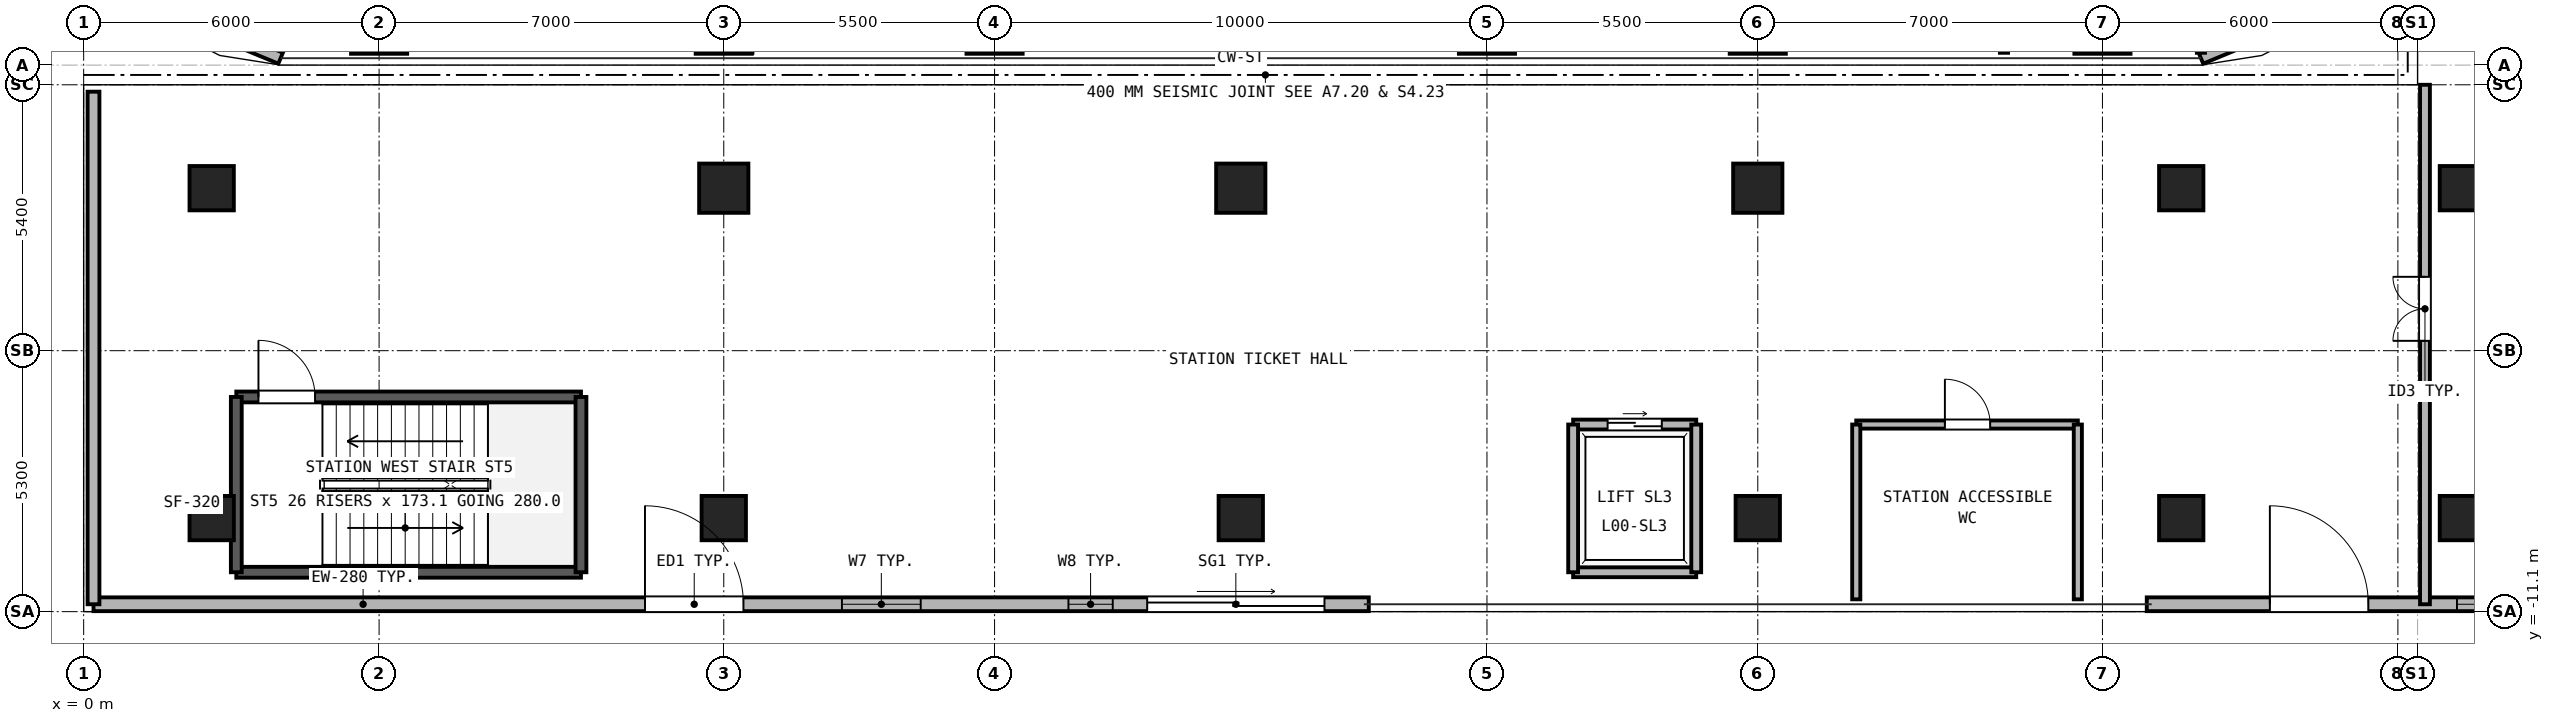
"""IFC4 building model, lengths in metres.
Left out: names, types, materials, properties, quantities, classifications, styles, units other than length and angle.
Written with IfcOpenShell. Run it as: python <this file> out.ifc"""

import sys

from ifc_helpers import new_model, si_unit, direction, frame, frame_2d, origin, origin_2d, place, context, subcontext, project, spatial, rectangle, hollow_rectangle, circle, extrude, source, transform, mapped, element, fill, save


model = new_model("IFC4")
c1 = context("Model", 3, precision=1e-05, world=origin(), true_north=direction((0.0, 1.0)))
c2 = subcontext(c1, "Body", "Model", "MODEL_VIEW")
j1 = project(units=[si_unit("LENGTHUNIT", "METRE"), si_unit("PLANEANGLEUNIT", "RADIAN")], contexts=[c1])
p1 = place(None, origin())
s1 = spatial("IfcSite", under=j1, at=p1, CompositionType="ELEMENT")
p2 = place(p1, origin())
s2 = spatial("IfcBuilding", under=s1, at=p2, CompositionType="ELEMENT")
p3 = place(p2, origin())
s3 = spatial("IfcBuildingStorey", under=s2, at=p3, CompositionType="ELEMENT", Elevation=0.0)
m1 = source(origin(), c2, "Body", "SweptSolid", [
    extrude(hollow_rectangle(XDim=1.14, YDim=1.14, WallThickness=0.07, at=origin_2d()), origin(), (0.0, 0.0, 1.0), 4.18),
])
for number, where, z_axis, x_axis in (
    (1, (6.0, 0.8, 0.0), (0.0, 0.0, 1.0), (1.0, 0.0, 0.0)),
    (2, (13.0, 0.8, 0.0), (0.0, 0.0, 1.0), (1.0, 0.0, 0.0)),
    (3, (18.5, 0.8, 0.0), (0.0, 0.0, 1.0), (1.0, 0.0, 0.0)),
    (4, (28.5, 0.8, 0.0), (0.0, 0.0, 1.0), (1.0, 0.0, 0.0)),
    (5, (34.0, 0.8, 0.0), (0.0, 0.0, 1.0), (1.0, 0.0, 0.0)),
    (6, (41.0, 0.8, 0.0), (0.0, 0.0, 1.0), (1.0, 0.0, 0.0)),
):
    element("IfcColumn", number, at=place(p3, frame(where, z_axis=z_axis, x_axis=x_axis)), inside=s3, PredefinedType="COLUMN", context=c2, shape_type="MappedRepresentation", body=[
        mapped(m1, transform((0.0, 0.0, 0.0), x_axis=(1.0, 0.0, 0.0), y_axis=(0.0, 1.0, 0.0), z_axis=(0.0, 0.0, 1.0), scale=1.0)),
    ])
m2 = source(origin(), c2, "Body", "SweptSolid", [
    extrude(hollow_rectangle(XDim=0.7, YDim=0.9, WallThickness=0.04, at=origin_2d()), origin(), (0.0, 0.0, 1.0), 4.18),
])
for number, where, z_axis, x_axis in (
    (7, (2.6, -9.2, 0.0), (0.0, 0.0, 1.0), (1.0, 0.0, 0.0)),
    (8, (2.6, -2.5, 0.0), (0.0, 0.0, 1.0), (1.0, 0.0, 0.0)),
    (9, (13.0, -9.2, 0.0), (0.0, 0.0, 1.0), (1.0, 0.0, 0.0)),
):
    element("IfcColumn", number, at=place(p3, frame(where, z_axis=z_axis, x_axis=x_axis)), inside=s3, PredefinedType="COLUMN", context=c2, shape_type="MappedRepresentation", body=[
        mapped(m2, transform((0.0, 0.0, 0.0), x_axis=(1.0, 0.0, 0.0), y_axis=(0.0, 1.0, 0.0), z_axis=(0.0, 0.0, 1.0), scale=1.0)),
    ])
m3 = source(origin(), c2, "Body", "SweptSolid", [
    extrude(circle(Radius=0.5, at=origin_2d()), origin(), (0.0, 0.0, 1.0), 4.18),
])
p4 = place(p3, frame((13.0, -2.5, 0.0), z_axis=(0.0, 0.0, 1.0), x_axis=(1.0, 0.0, 0.0)))
e10 = element("IfcColumn", 10, at=p4, inside=s3, PredefinedType="COLUMN", context=c2, shape_type="MappedRepresentation", body=[
    mapped(m3, transform((0.0, 0.0, 0.0), x_axis=(1.0, 0.0, 0.0), y_axis=(0.0, 1.0, 0.0), z_axis=(0.0, 0.0, 1.0), scale=1.0)),
])
p5 = place(p3, frame((23.5, -9.2, 0.0), z_axis=(0.0, 0.0, 1.0), x_axis=(1.0, 0.0, 0.0)))
e11 = element("IfcColumn", 11, at=p5, inside=s3, PredefinedType="COLUMN", context=c2, shape_type="MappedRepresentation", body=[
    mapped(m2, transform((0.0, 0.0, 0.0), x_axis=(1.0, 0.0, 0.0), y_axis=(0.0, 1.0, 0.0), z_axis=(0.0, 0.0, 1.0), scale=1.0)),
])
p6 = place(p3, frame((23.5, -2.5, 0.0), z_axis=(0.0, 0.0, 1.0), x_axis=(1.0, 0.0, 0.0)))
e12 = element("IfcColumn", 12, at=p6, inside=s3, PredefinedType="COLUMN", context=c2, shape_type="MappedRepresentation", body=[
    mapped(m3, transform((0.0, 0.0, 0.0), x_axis=(1.0, 0.0, 0.0), y_axis=(0.0, 1.0, 0.0), z_axis=(0.0, 0.0, 1.0), scale=1.0)),
])
p7 = place(p3, frame((34.0, -9.2, 0.0), z_axis=(0.0, 0.0, 1.0), x_axis=(1.0, 0.0, 0.0)))
e13 = element("IfcColumn", 13, at=p7, inside=s3, PredefinedType="COLUMN", context=c2, shape_type="MappedRepresentation", body=[
    mapped(m2, transform((0.0, 0.0, 0.0), x_axis=(1.0, 0.0, 0.0), y_axis=(0.0, 1.0, 0.0), z_axis=(0.0, 0.0, 1.0), scale=1.0)),
])
p8 = place(p3, frame((34.0, -2.5, 0.0), z_axis=(0.0, 0.0, 1.0), x_axis=(1.0, 0.0, 0.0)))
e14 = element("IfcColumn", 14, at=p8, inside=s3, PredefinedType="COLUMN", context=c2, shape_type="MappedRepresentation", body=[
    mapped(m3, transform((0.0, 0.0, 0.0), x_axis=(1.0, 0.0, 0.0), y_axis=(0.0, 1.0, 0.0), z_axis=(0.0, 0.0, 1.0), scale=1.0)),
])
for number, where, z_axis, x_axis in (
    (15, (42.6, -9.2, 0.0), (0.0, 0.0, 1.0), (1.0, 0.0, 0.0)),
    (16, (42.6, -2.5, 0.0), (0.0, 0.0, 1.0), (1.0, 0.0, 0.0)),
    (17, (48.3, -9.2, 0.0), (0.0, 0.0, 1.0), (1.0, 0.0, 0.0)),
    (18, (48.3, -2.5, 0.0), (0.0, 0.0, 1.0), (1.0, 0.0, 0.0)),
):
    element("IfcColumn", number, at=place(p3, frame(where, z_axis=z_axis, x_axis=x_axis)), inside=s3, PredefinedType="COLUMN", context=c2, shape_type="MappedRepresentation", body=[
        mapped(m2, transform((0.0, 0.0, 0.0), x_axis=(1.0, 0.0, 0.0), y_axis=(0.0, 1.0, 0.0), z_axis=(0.0, 0.0, 1.0), scale=1.0)),
    ])
for number, where, z_axis, x_axis in (
    (19, (43.0, 0.14, 0.0), (0.0, 0.0, 1.0), (0.924, 0.383, 0.0)),
    (20, (1.271, 1.271, 0.0), (0.0, 0.0, 1.0), (0.924, -0.383, 0.0)),
):
    element("IfcWall", number, at=place(p3, frame(where, z_axis=z_axis, x_axis=x_axis)), inside=s3, PredefinedType="SOLIDWALL", context=c2, shape_type="SweptSolid", body=[
        extrude(rectangle(XDim=2.954, YDim=0.24, at=frame_2d((1.477, 0.0))), origin(), (0.0, 0.0, 1.0), 4.18),
    ])
p9 = place(p3, frame((0.2, -10.95, 0.0), z_axis=(0.0, 0.0, 1.0), x_axis=(1.0, 0.0, 0.0)))
e21 = element("IfcWall", 21, at=p9, inside=s3, PredefinedType="SOLIDWALL", context=c2, shape_type="SweptSolid", body=[
    extrude(rectangle(XDim=25.9, YDim=0.28, at=frame_2d((12.95, 0.0))), origin(), (0.0, 0.0, 1.0), 4.18),
])
p10 = place(p9, frame((15.2, 0.0, 1.1)))
e22 = element("IfcOpeningElement", 22, at=p10, cuts=e21, PredefinedType="OPENING", context=c2, shape_type="SweptSolid", body=[
    extrude(rectangle(XDim=1.6, YDim=1.4, at=frame_2d((0.8, 0.7))), frame((0.0, 0.15, 0.0), z_axis=(0.0, -1.0, 0.0), x_axis=(1.0, 0.0, 0.0)), (0.0, 0.0, 1.0), 0.3),
])
p11 = place(p9, frame((19.8, 0.0, 1.1)))
e23 = element("IfcOpeningElement", 23, at=p11, cuts=e21, PredefinedType="OPENING", context=c2, shape_type="SweptSolid", body=[
    extrude(rectangle(XDim=0.9, YDim=1.5, at=frame_2d((0.45, 0.75))), frame((0.0, 0.15, 0.0), z_axis=(0.0, -1.0, 0.0), x_axis=(1.0, 0.0, 0.0)), (0.0, 0.0, 1.0), 0.3),
])
p12 = place(p9, frame((11.2, 0.0, 0.0)))
e24 = element("IfcOpeningElement", 24, at=p12, cuts=e21, PredefinedType="OPENING", context=c2, shape_type="SweptSolid", body=[
    extrude(rectangle(XDim=2.0, YDim=2.4, at=frame_2d((1.0, 1.2))), frame((0.0, 0.15, 0.0), z_axis=(0.0, -1.0, 0.0), x_axis=(1.0, 0.0, 0.0)), (0.0, 0.0, 1.0), 0.3),
])
p13 = place(p9, frame((21.4, 0.0, 0.0)))
e25 = element("IfcOpeningElement", 25, at=p13, cuts=e21, PredefinedType="OPENING", context=c2, shape_type="SweptSolid", body=[
    extrude(rectangle(XDim=3.6, YDim=3.2, at=frame_2d((1.8, 1.6))), frame((0.0, 0.15, 0.0), z_axis=(0.0, -1.0, 0.0), x_axis=(1.0, 0.0, 0.0)), (0.0, 0.0, 1.0), 0.3),
])
p14 = place(p3, frame((41.9, -10.95, 0.0), z_axis=(0.0, 0.0, 1.0), x_axis=(1.0, 0.0, 0.0)))
e26 = element("IfcWall", 26, at=p14, inside=s3, PredefinedType="SOLIDWALL", context=c2, shape_type="SweptSolid", body=[
    extrude(rectangle(XDim=29.55, YDim=0.28, at=frame_2d((14.775, 0.0))), origin(), (0.0, 0.0, 1.0), 4.18),
])
p15 = place(p14, frame((6.3, 0.0, 1.1)))
e27 = element("IfcOpeningElement", 27, at=p15, cuts=e26, PredefinedType="OPENING", context=c2, shape_type="SweptSolid", body=[
    extrude(rectangle(XDim=1.6, YDim=1.4, at=frame_2d((0.8, 0.7))), frame((0.0, 0.15, 0.0), z_axis=(0.0, -1.0, 0.0), x_axis=(1.0, 0.0, 0.0)), (0.0, 0.0, 1.0), 0.3),
])
p16 = place(p14, frame((2.5, 0.0, 0.0)))
e28 = element("IfcOpeningElement", 28, at=p16, cuts=e26, PredefinedType="OPENING", context=c2, shape_type="SweptSolid", body=[
    extrude(rectangle(XDim=2.0, YDim=2.4, at=frame_2d((1.0, 1.2))), frame((0.0, 0.15, 0.0), z_axis=(0.0, -1.0, 0.0), x_axis=(1.0, 0.0, 0.0)), (0.0, 0.0, 1.0), 0.3),
])
p17 = place(p14, frame((9.7, 0.0, 0.0)))
e29 = element("IfcOpeningElement", 29, at=p17, cuts=e26, PredefinedType="OPENING", context=c2, shape_type="SweptSolid", body=[
    extrude(rectangle(XDim=3.6, YDim=3.2, at=frame_2d((1.8, 1.6))), frame((0.0, 0.15, 0.0), z_axis=(0.0, -1.0, 0.0), x_axis=(1.0, 0.0, 0.0)), (0.0, 0.0, 1.0), 0.3),
])
p18 = place(p14, frame((22.1, 0.0, 0.0)))
e30 = element("IfcOpeningElement", 30, at=p18, cuts=e26, PredefinedType="OPENING", context=c2, shape_type="SweptSolid", body=[
    extrude(rectangle(XDim=3.6, YDim=3.2, at=frame_2d((1.8, 1.6))), frame((0.0, 0.15, 0.0), z_axis=(0.0, -1.0, 0.0), x_axis=(1.0, 0.0, 0.0)), (0.0, 0.0, 1.0), 0.3),
])
p19 = place(p3, frame((0.2, -10.95, 0.0), z_axis=(0.0, 0.0, 1.0), x_axis=(0.0, 1.0, 0.0)))
e31 = element("IfcWall", 31, at=p19, inside=s3, PredefinedType="SOLIDWALL", context=c2, shape_type="SweptSolid", body=[
    extrude(rectangle(XDim=10.41, YDim=0.24, at=frame_2d((5.205, 0.0))), origin(), (0.0, 0.0, 1.0), 4.18),
])
p20 = place(p3, frame((3.1, -10.3, 0.0), z_axis=(0.0, 0.0, 1.0), x_axis=(1.0, 0.0, 0.0)))
e32 = element("IfcWall", 32, at=p20, inside=s3, PredefinedType="SOLIDWALL", context=c2, shape_type="SweptSolid", body=[
    extrude(rectangle(XDim=7.0, YDim=0.22, at=frame_2d((3.5, 0.0))), origin(), (0.0, 0.0, 1.0), 4.18),
])
p21 = place(p3, frame((3.1, -6.74, 0.0), z_axis=(0.0, 0.0, 1.0), x_axis=(1.0, 0.0, 0.0)))
e33 = element("IfcWall", 33, at=p21, inside=s3, PredefinedType="SOLIDWALL", context=c2, shape_type="SweptSolid", body=[
    extrude(rectangle(XDim=7.0, YDim=0.22, at=frame_2d((3.5, 0.0))), origin(), (0.0, 0.0, 1.0), 4.18),
])
p22 = place(p21, frame((0.45, 0.0, 0.0)))
e34 = element("IfcOpeningElement", 34, at=p22, cuts=e33, PredefinedType="OPENING", context=c2, shape_type="SweptSolid", body=[
    extrude(rectangle(XDim=1.15, YDim=2.2, at=frame_2d((0.575, 1.1))), frame((0.0, 0.12, 0.0), z_axis=(0.0, -1.0, 0.0), x_axis=(1.0, 0.0, 0.0)), (0.0, 0.0, 1.0), 0.24),
])
for number, where, z_axis, x_axis in (
    (35, (3.1, -10.3, 0.0), (0.0, 0.0, 1.0), (0.0, 1.0, 0.0)),
    (36, (10.1, -10.3, 0.0), (0.0, 0.0, 1.0), (0.0, 1.0, 0.0)),
):
    element("IfcWall", number, at=place(p3, frame(where, z_axis=z_axis, x_axis=x_axis)), inside=s3, PredefinedType="SOLIDWALL", context=c2, shape_type="SweptSolid", body=[
        extrude(rectangle(XDim=3.56, YDim=0.22, at=frame_2d((1.78, 0.0))), origin(), (0.0, 0.0, 1.0), 4.18),
    ])
p23 = place(p3, frame((30.25, -10.3, 0.0), z_axis=(0.0, 0.0, 1.0), x_axis=(1.0, 0.0, 0.0)))
e37 = element("IfcWall", 37, at=p23, inside=s3, PredefinedType="PARTITIONING", context=c2, shape_type="SweptSolid", body=[
    extrude(rectangle(XDim=2.5, YDim=0.2, at=frame_2d((1.25, 0.0))), origin(), (0.0, 0.0, 1.0), 4.18),
])
p24 = place(p3, frame((30.25, -7.3, 0.0), z_axis=(0.0, 0.0, 1.0), x_axis=(1.0, 0.0, 0.0)))
e38 = element("IfcWall", 38, at=p24, inside=s3, PredefinedType="PARTITIONING", context=c2, shape_type="SweptSolid", body=[
    extrude(rectangle(XDim=2.5, YDim=0.2, at=frame_2d((1.25, 0.0))), origin(), (0.0, 0.0, 1.0), 4.18),
])
p25 = place(p24, frame((0.7, 0.0, 0.0)))
e39 = element("IfcOpeningElement", 39, at=p25, cuts=e38, PredefinedType="OPENING", context=c2, shape_type="SweptSolid", body=[
    extrude(rectangle(XDim=1.1, YDim=2.25, at=frame_2d((0.55, 1.125))), frame((0.0, 0.11, 0.0), z_axis=(0.0, -1.0, 0.0), x_axis=(1.0, 0.0, 0.0)), (0.0, 0.0, 1.0), 0.22),
])
for number, where, z_axis, x_axis in (
    (40, (30.25, -10.3, 0.0), (0.0, 0.0, 1.0), (0.0, 1.0, 0.0)),
    (41, (32.75, -10.3, 0.0), (0.0, 0.0, 1.0), (0.0, 1.0, 0.0)),
):
    element("IfcWall", number, at=place(p3, frame(where, z_axis=z_axis, x_axis=x_axis)), inside=s3, PredefinedType="PARTITIONING", context=c2, shape_type="SweptSolid", body=[
        extrude(rectangle(XDim=3.0, YDim=0.2, at=frame_2d((1.5, 0.0))), origin(), (0.0, 0.0, 1.0), 4.18),
    ])
p26 = place(p3, frame((47.55, -10.95, 0.0), z_axis=(0.0, 0.0, 1.0), x_axis=(0.0, 1.0, 0.0)))
e42 = element("IfcWall", 42, at=p26, inside=s3, PredefinedType="PARTITIONING", context=c2, shape_type="SweptSolid", body=[
    extrude(rectangle(XDim=10.55, YDim=0.2, at=frame_2d((5.275, 0.0))), origin(), (0.0, 0.0, 1.0), 4.18),
])
p27 = place(p26, frame((5.35, 0.0, 0.0)))
e43 = element("IfcOpeningElement", 43, at=p27, cuts=e42, PredefinedType="OPENING", context=c2, shape_type="SweptSolid", body=[
    extrude(rectangle(XDim=1.3, YDim=2.2, at=frame_2d((0.65, 1.1))), frame((0.0, 0.11, 0.0), z_axis=(0.0, -1.0, 0.0), x_axis=(1.0, 0.0, 0.0)), (0.0, 0.0, 1.0), 0.22),
])
p28 = place(p3, frame((36.0, -7.3, 0.0), z_axis=(0.0, 0.0, 1.0), x_axis=(1.0, 0.0, 0.0)))
e44 = element("IfcWall", 44, at=p28, inside=s3, PredefinedType="PARTITIONING", context=c2, shape_type="SweptSolid", body=[
    extrude(rectangle(XDim=4.5, YDim=0.165, at=frame_2d((2.25, 0.0))), origin(), (0.0, 0.0, 1.0), 4.18),
])
p29 = place(p28, frame((1.8, 0.0, 0.0)))
e45 = element("IfcOpeningElement", 45, at=p29, cuts=e44, PredefinedType="OPENING", context=c2, shape_type="SweptSolid", body=[
    extrude(rectangle(XDim=0.92, YDim=2.1, at=frame_2d((0.46, 1.05))), frame((0.0, 0.093, 0.0), z_axis=(0.0, -1.0, 0.0), x_axis=(1.0, 0.0, 0.0)), (0.0, 0.0, 1.0), 0.185),
])
for number, where, z_axis, x_axis in (
    (46, (36.0, -10.85, 0.0), (0.0, 0.0, 1.0), (0.0, 1.0, 0.0)),
    (47, (40.5, -10.85, 0.0), (0.0, 0.0, 1.0), (0.0, 1.0, 0.0)),
):
    element("IfcWall", number, at=place(p3, frame(where, z_axis=z_axis, x_axis=x_axis)), inside=s3, PredefinedType="PARTITIONING", context=c2, shape_type="SweptSolid", body=[
        extrude(rectangle(XDim=3.55, YDim=0.165, at=frame_2d((1.775, 0.0))), origin(), (0.0, 0.0, 1.0), 4.18),
    ])
p30 = place(p10, origin())
e48 = element("IfcWindow", 48, at=p30, inside=s3, PartitioningType="SINGLE_PANEL", PredefinedType="WINDOW", context=c2, shape_type="SweptSolid", body=[
    extrude(rectangle(XDim=1.6, YDim=1.4, at=frame_2d((0.8, 0.7))), frame((0.0, 0.03, 0.0), z_axis=(0.0, -1.0, 0.0), x_axis=(1.0, 0.0, 0.0)), (0.0, 0.0, 1.0), 0.06),
])
fill(e22, e48)
p31 = place(p11, origin())
e49 = element("IfcWindow", 49, at=p31, inside=s3, PartitioningType="SINGLE_PANEL", PredefinedType="WINDOW", context=c2, shape_type="SweptSolid", body=[
    extrude(rectangle(XDim=0.9, YDim=1.5, at=frame_2d((0.45, 0.75))), frame((0.0, 0.03, 0.0), z_axis=(0.0, -1.0, 0.0), x_axis=(1.0, 0.0, 0.0)), (0.0, 0.0, 1.0), 0.06),
])
fill(e23, e49)
p32 = place(p15, origin())
e50 = element("IfcWindow", 50, at=p32, inside=s3, PartitioningType="SINGLE_PANEL", PredefinedType="WINDOW", context=c2, shape_type="SweptSolid", body=[
    extrude(rectangle(XDim=1.6, YDim=1.4, at=frame_2d((0.8, 0.7))), frame((0.0, 0.03, 0.0), z_axis=(0.0, -1.0, 0.0), x_axis=(1.0, 0.0, 0.0)), (0.0, 0.0, 1.0), 0.06),
])
fill(e27, e50)
p33 = place(p12, origin())
e51 = element("IfcDoor", 51, at=p33, inside=s3, OperationType="REVOLVING", PredefinedType="DOOR", context=c2, shape_type="SweptSolid", body=[
    extrude(rectangle(XDim=2.0, YDim=2.4, at=frame_2d((1.0, 1.2))), frame((0.0, 0.025, 0.0), z_axis=(0.0, -1.0, 0.0), x_axis=(1.0, 0.0, 0.0)), (0.0, 0.0, 1.0), 0.05),
])
fill(e24, e51)
p34 = place(p16, origin())
e52 = element("IfcDoor", 52, at=p34, inside=s3, OperationType="REVOLVING", PredefinedType="DOOR", context=c2, shape_type="SweptSolid", body=[
    extrude(rectangle(XDim=2.0, YDim=2.4, at=frame_2d((1.0, 1.2))), frame((0.0, 0.025, 0.0), z_axis=(0.0, -1.0, 0.0), x_axis=(1.0, 0.0, 0.0)), (0.0, 0.0, 1.0), 0.05),
])
fill(e28, e52)
p35 = place(p13, origin())
e53 = element("IfcDoor", 53, at=p35, inside=s3, OperationType="ROLLINGUP", PredefinedType="GATE", context=c2, shape_type="SweptSolid", body=[
    extrude(rectangle(XDim=3.6, YDim=3.2, at=frame_2d((1.8, 1.6))), frame((0.0, 0.025, 0.0), z_axis=(0.0, -1.0, 0.0), x_axis=(1.0, 0.0, 0.0)), (0.0, 0.0, 1.0), 0.05),
])
fill(e25, e53)
p36 = place(p22, origin())
e54 = element("IfcDoor", 54, at=p36, inside=s3, OperationType="SINGLE_SWING_LEFT", PredefinedType="DOOR", context=c2, shape_type="SweptSolid", body=[
    extrude(rectangle(XDim=1.15, YDim=2.2, at=frame_2d((0.575, 1.1))), frame((0.0, 0.025, 0.0), z_axis=(0.0, -1.0, 0.0), x_axis=(1.0, 0.0, 0.0)), (0.0, 0.0, 1.0), 0.05),
])
fill(e34, e54)
p37 = place(p25, origin())
e55 = element("IfcDoor", 55, at=p37, inside=s3, OperationType="DOUBLE_DOOR_SLIDING", PredefinedType="DOOR", context=c2, shape_type="SweptSolid", body=[
    extrude(rectangle(XDim=1.1, YDim=2.25, at=frame_2d((0.55, 1.125))), frame((0.0, 0.025, 0.0), z_axis=(0.0, -1.0, 0.0), x_axis=(1.0, 0.0, 0.0)), (0.0, 0.0, 1.0), 0.05),
])
fill(e39, e55)
p38 = place(p27, origin())
e56 = element("IfcDoor", 56, at=p38, inside=s3, OperationType="DOUBLE_DOOR_SINGLE_SWING", PredefinedType="DOOR", context=c2, shape_type="SweptSolid", body=[
    extrude(rectangle(XDim=1.3, YDim=2.2, at=frame_2d((0.65, 1.1))), frame((0.0, 0.025, 0.0), z_axis=(0.0, -1.0, 0.0), x_axis=(1.0, 0.0, 0.0)), (0.0, 0.0, 1.0), 0.05),
])
fill(e43, e56)
p39 = place(p29, origin())
e57 = element("IfcDoor", 57, at=p39, inside=s3, OperationType="SINGLE_SWING_LEFT", PredefinedType="DOOR", context=c2, shape_type="SweptSolid", body=[
    extrude(rectangle(XDim=0.92, YDim=2.1, at=frame_2d((0.46, 1.05))), frame((0.0, 0.025, 0.0), z_axis=(0.0, -1.0, 0.0), x_axis=(1.0, 0.0, 0.0)), (0.0, 0.0, 1.0), 0.05),
])
fill(e45, e57)
save(model, sys.argv[1])
